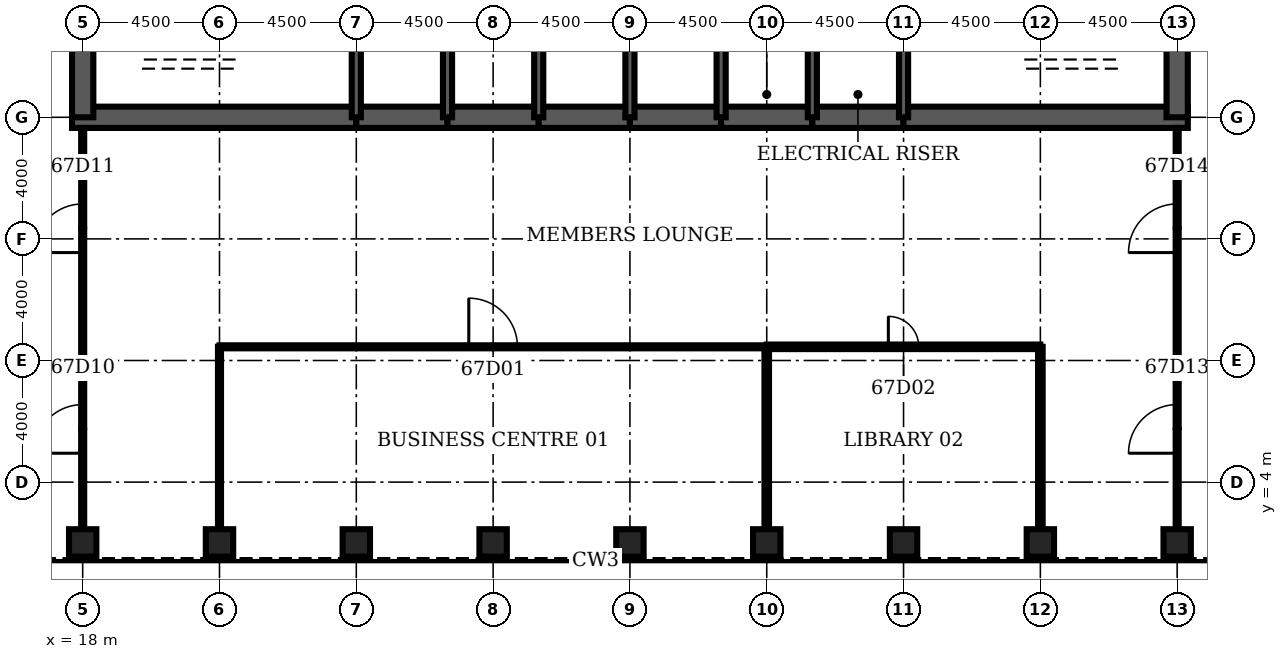
"""IFC4 building model, lengths in metres.
Left out: names, types, materials, properties, quantities, classifications, styles, units other than length and angle.
Written with IfcOpenShell. Run it as: python <this file> out.ifc"""

import sys

from ifc_helpers import new_model, si_unit, direction, frame, frame_2d, origin, origin_2d, place, context, subcontext, project, spatial, rectangle, hollow_rectangle, extrude, element, fill, save


model = new_model("IFC4")
c1 = context("Model", 3, precision=1e-05, world=origin(), true_north=direction((0.0, 1.0)))
c2 = subcontext(c1, "Body", "Model", "MODEL_VIEW")
j1 = project(units=[si_unit("LENGTHUNIT", "METRE"), si_unit("PLANEANGLEUNIT", "RADIAN")], contexts=[c1])
p1 = place(None, origin())
s1 = spatial("IfcSite", under=j1, at=p1, CompositionType="ELEMENT")
p2 = place(p1, origin())
s2 = spatial("IfcBuilding", under=s1, at=p2, CompositionType="ELEMENT")
p3 = place(p2, frame((0.0, 0.0, 296.3)))
s3 = spatial("IfcBuildingStorey", under=s2, at=p3, CompositionType="ELEMENT", Elevation=296.3)
for number, where, z_axis, x_axis in (
    (1, (18.0, 2.0, 0.0), (0.0, 0.0, 1.0), (0.0, 1.0, 0.0)),
    (2, (22.5, 2.0, 0.0), (0.0, 0.0, 1.0), (0.0, 1.0, 0.0)),
    (3, (27.0, 2.0, 0.0), (0.0, 0.0, 1.0), (0.0, 1.0, 0.0)),
    (4, (31.5, 2.0, 0.0), (0.0, 0.0, 1.0), (0.0, 1.0, 0.0)),
    (5, (36.0, 2.0, 0.0), (0.0, 0.0, 1.0), (0.0, 1.0, 0.0)),
    (6, (40.5, 2.0, 0.0), (0.0, 0.0, 1.0), (0.0, 1.0, 0.0)),
    (7, (45.0, 2.0, 0.0), (0.0, 0.0, 1.0), (0.0, 1.0, 0.0)),
    (8, (49.5, 2.0, 0.0), (0.0, 0.0, 1.0), (0.0, 1.0, 0.0)),
    (9, (54.0, 2.0, 0.0), (0.0, 0.0, 1.0), (0.0, 1.0, 0.0)),
):
    element("IfcColumn", number, at=place(p3, frame(where, z_axis=z_axis, x_axis=x_axis)), inside=s3, PredefinedType="COLUMN", context=c2, shape_type="SweptSolid", body=[
        extrude(hollow_rectangle(XDim=0.9, YDim=0.9, WallThickness=0.06, at=origin_2d()), origin(), (0.0, 0.0, 1.0), 4.2),
    ])
p4 = place(p3, frame((17.65, 16.0, 0.0), z_axis=(0.0, 0.0, 1.0), x_axis=(1.0, 0.0, 0.0)))
e10 = element("IfcWall", 10, at=p4, inside=s3, PredefinedType="SHEAR", context=c2, shape_type="SweptSolid", body=[
    extrude(rectangle(XDim=9.35, YDim=0.7, at=frame_2d((4.675, 0.0))), origin(), (0.0, 0.0, 1.0), 4.2),
])
for number, where, z_axis, x_axis in (
    (11, (27.0, 16.0, 0.0), (0.0, 0.0, 1.0), (1.0, 0.0, 0.0)),
    (12, (30.0, 16.0, 0.0), (0.0, 0.0, 1.0), (1.0, 0.0, 0.0)),
    (13, (33.0, 16.0, 0.0), (0.0, 0.0, 1.0), (1.0, 0.0, 0.0)),
    (14, (36.0, 16.0, 0.0), (0.0, 0.0, 1.0), (1.0, 0.0, 0.0)),
    (15, (39.0, 16.0, 0.0), (0.0, 0.0, 1.0), (1.0, 0.0, 0.0)),
    (16, (42.0, 16.0, 0.0), (0.0, 0.0, 1.0), (1.0, 0.0, 0.0)),
):
    element("IfcWall", number, at=place(p3, frame(where, z_axis=z_axis, x_axis=x_axis)), inside=s3, PredefinedType="SHEAR", context=c2, shape_type="SweptSolid", body=[
        extrude(rectangle(XDim=3.0, YDim=0.7, at=frame_2d((1.5, 0.0))), origin(), (0.0, 0.0, 1.0), 4.2),
    ])
p5 = place(p3, frame((45.0, 16.0, 0.0), z_axis=(0.0, 0.0, 1.0), x_axis=(1.0, 0.0, 0.0)))
e17 = element("IfcWall", 17, at=p5, inside=s3, PredefinedType="SHEAR", context=c2, shape_type="SweptSolid", body=[
    extrude(rectangle(XDim=9.35, YDim=0.7, at=frame_2d((4.675, 0.0))), origin(), (0.0, 0.0, 1.0), 4.2),
])
for number, where, z_axis, x_axis in (
    (18, (18.0, 19.2, 0.0), (0.0, 0.0, 1.0), (0.0, -1.0, 0.0)),
    (19, (54.0, 16.0, 0.0), (0.0, 0.0, 1.0), (0.0, 1.0, 0.0)),
):
    element("IfcWall", number, at=place(p3, frame(where, z_axis=z_axis, x_axis=x_axis)), inside=s3, PredefinedType="SHEAR", context=c2, shape_type="SweptSolid", body=[
        extrude(rectangle(XDim=3.2, YDim=0.7, at=frame_2d((1.6, 0.0))), origin(), (0.0, 0.0, 1.0), 4.2),
    ])
for number, where, z_axis, x_axis in (
    (20, (27.0, 16.0, 0.0), (0.0, 0.0, 1.0), (0.0, 1.0, 0.0)),
    (21, (30.0, 16.0, 0.0), (0.0, 0.0, 1.0), (0.0, 1.0, 0.0)),
    (22, (33.0, 16.0, 0.0), (0.0, 0.0, 1.0), (0.0, 1.0, 0.0)),
    (23, (36.0, 16.0, 0.0), (0.0, 0.0, 1.0), (0.0, 1.0, 0.0)),
    (24, (39.0, 16.0, 0.0), (0.0, 0.0, 1.0), (0.0, 1.0, 0.0)),
    (25, (42.0, 16.0, 0.0), (0.0, 0.0, 1.0), (0.0, 1.0, 0.0)),
    (26, (45.0, 16.0, 0.0), (0.0, 0.0, 1.0), (0.0, 1.0, 0.0)),
):
    element("IfcWall", number, at=place(p3, frame(where, z_axis=z_axis, x_axis=x_axis)), inside=s3, PredefinedType="SOLIDWALL", context=c2, shape_type="SweptSolid", body=[
        extrude(rectangle(XDim=3.2, YDim=0.3, at=frame_2d((1.6, 0.0))), origin(), (0.0, 0.0, 1.0), 4.2),
    ])
p6 = place(p3, frame((39.15, 17.3, 0.0), z_axis=(0.0, 0.0, 1.0), x_axis=(1.0, 0.0, 0.0)))
e27 = element("IfcWall", 27, at=p6, inside=s3, PredefinedType="SOLIDWALL", context=c2, shape_type="SweptSolid", body=[
    extrude(rectangle(XDim=2.7, YDim=0.3, at=frame_2d((1.35, 0.0))), origin(), (0.0, 0.0, 1.0), 4.04),
])
p7 = place(p6, frame((0.85, 0.0, 0.0)))
e28 = element("IfcOpeningElement", 28, at=p7, cuts=e27, PredefinedType="OPENING", context=c2, shape_type="SweptSolid", body=[
    extrude(rectangle(XDim=1.0, YDim=2.1, at=frame_2d((0.5, 1.05))), frame((0.0, 0.16, 0.0), z_axis=(0.0, -1.0, 0.0), x_axis=(1.0, 0.0, 0.0)), (0.0, 0.0, 1.0), 0.32),
])
p8 = place(p3, frame((42.15, 17.3, 0.0), z_axis=(0.0, 0.0, 1.0), x_axis=(1.0, 0.0, 0.0)))
e29 = element("IfcWall", 29, at=p8, inside=s3, PredefinedType="SOLIDWALL", context=c2, shape_type="SweptSolid", body=[
    extrude(rectangle(XDim=2.7, YDim=0.3, at=frame_2d((1.35, 0.0))), origin(), (0.0, 0.0, 1.0), 4.04),
])
p9 = place(p8, frame((0.85, 0.0, 0.0)))
e30 = element("IfcOpeningElement", 30, at=p9, cuts=e29, PredefinedType="OPENING", context=c2, shape_type="SweptSolid", body=[
    extrude(rectangle(XDim=1.0, YDim=2.1, at=frame_2d((0.5, 1.05))), frame((0.0, 0.16, 0.0), z_axis=(0.0, -1.0, 0.0), x_axis=(1.0, 0.0, 0.0)), (0.0, 0.0, 1.0), 0.32),
])
p10 = place(p3, frame((22.5, 8.45, 0.0), z_axis=(0.0, 0.0, 1.0), x_axis=(1.0, 0.0, 0.0)))
e31 = element("IfcWall", 31, at=p10, inside=s3, PredefinedType="PARTITIONING", context=c2, shape_type="SweptSolid", body=[
    extrude(rectangle(XDim=18.0, YDim=0.1, at=frame_2d((9.0, 0.0))), origin(), (0.0, 0.0, 1.0), 3.0),
])
p11 = place(p10, frame((8.2, 0.0, 0.0)))
e32 = element("IfcOpeningElement", 32, at=p11, cuts=e31, PredefinedType="OPENING", context=c2, shape_type="SweptSolid", body=[
    extrude(rectangle(XDim=1.6, YDim=2.1, at=frame_2d((0.8, 1.05))), frame((0.0, 0.06, 0.0), z_axis=(0.0, -1.0, 0.0), x_axis=(1.0, 0.0, 0.0)), (0.0, 0.0, 1.0), 0.12),
])
p12 = place(p3, frame((40.5, 8.45, 0.0), z_axis=(0.0, 0.0, 1.0), x_axis=(1.0, 0.0, 0.0)))
e33 = element("IfcWall", 33, at=p12, inside=s3, PredefinedType="PARTITIONING", context=c2, shape_type="SweptSolid", body=[
    extrude(rectangle(XDim=9.0, YDim=0.15, at=frame_2d((4.5, 0.0))), origin(), (0.0, 0.0, 1.0), 3.0),
])
p13 = place(p12, frame((4.0, 0.0, 0.0)))
e34 = element("IfcOpeningElement", 34, at=p13, cuts=e33, PredefinedType="OPENING", context=c2, shape_type="SweptSolid", body=[
    extrude(rectangle(XDim=1.0, YDim=2.1, at=frame_2d((0.5, 1.05))), frame((0.0, 0.085, 0.0), z_axis=(0.0, -1.0, 0.0), x_axis=(1.0, 0.0, 0.0)), (0.0, 0.0, 1.0), 0.17),
])
p14 = place(p3, frame((18.0, 2.45, 0.0), z_axis=(0.0, 0.0, 1.0), x_axis=(0.0, 1.0, 0.0)))
e35 = element("IfcWall", 35, at=p14, inside=s3, PredefinedType="PARTITIONING", context=c2, shape_type="SweptSolid", body=[
    extrude(rectangle(XDim=13.2, YDim=0.1, at=frame_2d((6.6, 0.0))), origin(), (0.0, 0.0, 1.0), 3.0),
])
p15 = place(p14, frame((2.5, 0.0, 0.0)))
e36 = element("IfcOpeningElement", 36, at=p15, cuts=e35, PredefinedType="OPENING", context=c2, shape_type="SweptSolid", body=[
    extrude(rectangle(XDim=1.6, YDim=2.1, at=frame_2d((0.8, 1.05))), frame((0.0, 0.06, 0.0), z_axis=(0.0, -1.0, 0.0), x_axis=(1.0, 0.0, 0.0)), (0.0, 0.0, 1.0), 0.12),
])
p16 = place(p14, frame((9.1, 0.0, 0.0)))
e37 = element("IfcOpeningElement", 37, at=p16, cuts=e35, PredefinedType="OPENING", context=c2, shape_type="SweptSolid", body=[
    extrude(rectangle(XDim=1.6, YDim=2.1, at=frame_2d((0.8, 1.05))), frame((0.0, 0.06, 0.0), z_axis=(0.0, -1.0, 0.0), x_axis=(1.0, 0.0, 0.0)), (0.0, 0.0, 1.0), 0.12),
])
p17 = place(p3, frame((22.5, 2.45, 0.0), z_axis=(0.0, 0.0, 1.0), x_axis=(0.0, 1.0, 0.0)))
e38 = element("IfcWall", 38, at=p17, inside=s3, PredefinedType="PARTITIONING", context=c2, shape_type="SweptSolid", body=[
    extrude(rectangle(XDim=6.0, YDim=0.1, at=frame_2d((3.0, 0.0))), origin(), (0.0, 0.0, 1.0), 3.0),
])
for number, where, z_axis, x_axis in (
    (39, (40.5, 2.45, 0.0), (0.0, 0.0, 1.0), (0.0, 1.0, 0.0)),
    (40, (49.5, 2.45, 0.0), (0.0, 0.0, 1.0), (0.0, 1.0, 0.0)),
):
    element("IfcWall", number, at=place(p3, frame(where, z_axis=z_axis, x_axis=x_axis)), inside=s3, PredefinedType="PARTITIONING", context=c2, shape_type="SweptSolid", body=[
        extrude(rectangle(XDim=6.0, YDim=0.15, at=frame_2d((3.0, 0.0))), origin(), (0.0, 0.0, 1.0), 3.0),
    ])
p18 = place(p3, frame((54.0, 2.45, 0.0), z_axis=(0.0, 0.0, 1.0), x_axis=(0.0, 1.0, 0.0)))
e41 = element("IfcWall", 41, at=p18, inside=s3, PredefinedType="PARTITIONING", context=c2, shape_type="SweptSolid", body=[
    extrude(rectangle(XDim=13.2, YDim=0.1, at=frame_2d((6.6, 0.0))), origin(), (0.0, 0.0, 1.0), 3.0),
])
p19 = place(p18, frame((2.5, 0.0, 0.0)))
e42 = element("IfcOpeningElement", 42, at=p19, cuts=e41, PredefinedType="OPENING", context=c2, shape_type="SweptSolid", body=[
    extrude(rectangle(XDim=1.6, YDim=2.1, at=frame_2d((0.8, 1.05))), frame((0.0, 0.06, 0.0), z_axis=(0.0, -1.0, 0.0), x_axis=(1.0, 0.0, 0.0)), (0.0, 0.0, 1.0), 0.12),
])
p20 = place(p18, frame((9.1, 0.0, 0.0)))
e43 = element("IfcOpeningElement", 43, at=p20, cuts=e41, PredefinedType="OPENING", context=c2, shape_type="SweptSolid", body=[
    extrude(rectangle(XDim=1.6, YDim=2.1, at=frame_2d((0.8, 1.05))), frame((0.0, 0.06, 0.0), z_axis=(0.0, -1.0, 0.0), x_axis=(1.0, 0.0, 0.0)), (0.0, 0.0, 1.0), 0.12),
])
p21 = place(p7, origin())
e44 = element("IfcDoor", 44, at=p21, inside=s3, OperationType="SINGLE_SWING_LEFT", PredefinedType="DOOR", context=c2, shape_type="SweptSolid", body=[
    extrude(rectangle(XDim=1.0, YDim=2.1, at=frame_2d((0.5, 1.05))), frame((0.0, 0.025, 0.0), z_axis=(0.0, -1.0, 0.0), x_axis=(1.0, 0.0, 0.0)), (0.0, 0.0, 1.0), 0.05),
])
fill(e28, e44)
p22 = place(p9, origin())
e45 = element("IfcDoor", 45, at=p22, inside=s3, OperationType="SINGLE_SWING_LEFT", PredefinedType="DOOR", context=c2, shape_type="SweptSolid", body=[
    extrude(rectangle(XDim=1.0, YDim=2.1, at=frame_2d((0.5, 1.05))), frame((0.0, 0.025, 0.0), z_axis=(0.0, -1.0, 0.0), x_axis=(1.0, 0.0, 0.0)), (0.0, 0.0, 1.0), 0.05),
])
fill(e30, e45)
p23 = place(p11, origin())
e46 = element("IfcDoor", 46, at=p23, inside=s3, OperationType="SINGLE_SWING_LEFT", PredefinedType="DOOR", context=c2, shape_type="SweptSolid", body=[
    extrude(rectangle(XDim=1.6, YDim=2.1, at=frame_2d((0.8, 1.05))), frame((0.0, 0.025, 0.0), z_axis=(0.0, -1.0, 0.0), x_axis=(1.0, 0.0, 0.0)), (0.0, 0.0, 1.0), 0.05),
])
fill(e32, e46)
p24 = place(p13, origin())
e47 = element("IfcDoor", 47, at=p24, inside=s3, OperationType="SINGLE_SWING_LEFT", PredefinedType="DOOR", context=c2, shape_type="SweptSolid", body=[
    extrude(rectangle(XDim=1.0, YDim=2.1, at=frame_2d((0.5, 1.05))), frame((0.0, 0.025, 0.0), z_axis=(0.0, -1.0, 0.0), x_axis=(1.0, 0.0, 0.0)), (0.0, 0.0, 1.0), 0.05),
])
fill(e34, e47)
p25 = place(p15, origin())
e48 = element("IfcDoor", 48, at=p25, inside=s3, OperationType="SINGLE_SWING_LEFT", PredefinedType="DOOR", context=c2, shape_type="SweptSolid", body=[
    extrude(rectangle(XDim=1.6, YDim=2.1, at=frame_2d((0.8, 1.05))), frame((0.0, 0.025, 0.0), z_axis=(0.0, -1.0, 0.0), x_axis=(1.0, 0.0, 0.0)), (0.0, 0.0, 1.0), 0.05),
])
fill(e36, e48)
p26 = place(p16, origin())
e49 = element("IfcDoor", 49, at=p26, inside=s3, OperationType="SINGLE_SWING_LEFT", PredefinedType="DOOR", context=c2, shape_type="SweptSolid", body=[
    extrude(rectangle(XDim=1.6, YDim=2.1, at=frame_2d((0.8, 1.05))), frame((0.0, 0.025, 0.0), z_axis=(0.0, -1.0, 0.0), x_axis=(1.0, 0.0, 0.0)), (0.0, 0.0, 1.0), 0.05),
])
fill(e37, e49)
p27 = place(p19, origin())
e50 = element("IfcDoor", 50, at=p27, inside=s3, OperationType="SINGLE_SWING_LEFT", PredefinedType="DOOR", context=c2, shape_type="SweptSolid", body=[
    extrude(rectangle(XDim=1.6, YDim=2.1, at=frame_2d((0.8, 1.05))), frame((0.0, 0.025, 0.0), z_axis=(0.0, -1.0, 0.0), x_axis=(1.0, 0.0, 0.0)), (0.0, 0.0, 1.0), 0.05),
])
fill(e42, e50)
p28 = place(p20, origin())
e51 = element("IfcDoor", 51, at=p28, inside=s3, OperationType="SINGLE_SWING_LEFT", PredefinedType="DOOR", context=c2, shape_type="SweptSolid", body=[
    extrude(rectangle(XDim=1.6, YDim=2.1, at=frame_2d((0.8, 1.05))), frame((0.0, 0.025, 0.0), z_axis=(0.0, -1.0, 0.0), x_axis=(1.0, 0.0, 0.0)), (0.0, 0.0, 1.0), 0.05),
])
fill(e43, e51)
save(model, sys.argv[1])
